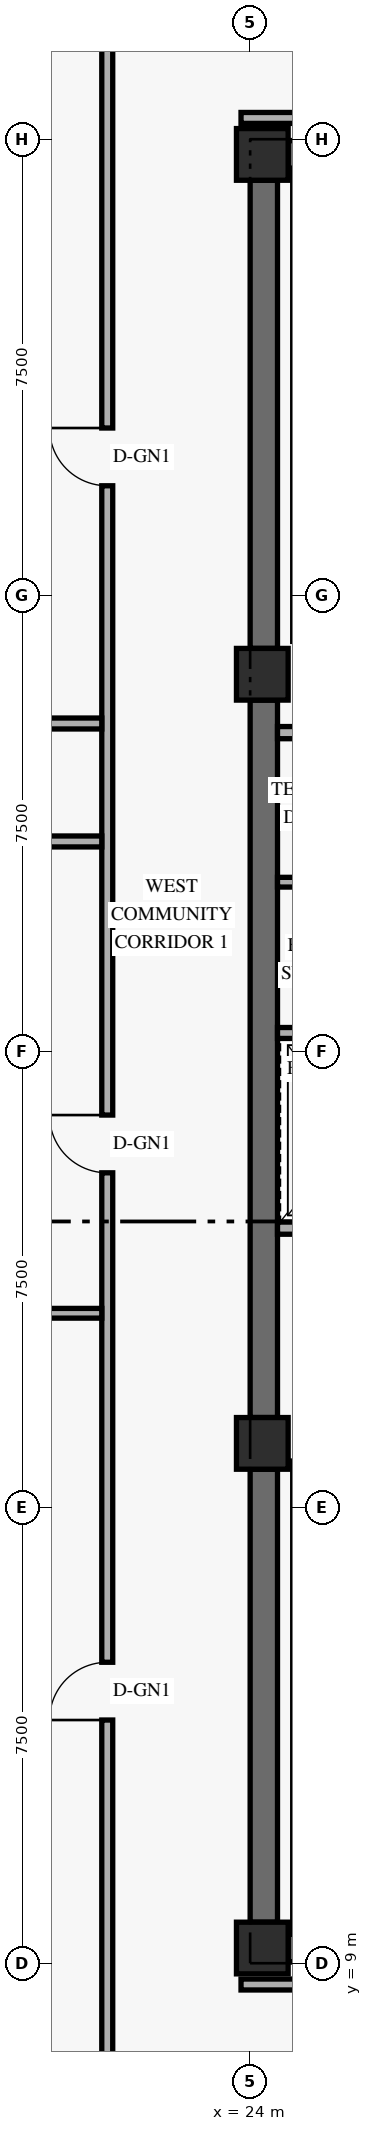
"""IFC4 building model, lengths in metres.
Left out: names, types, materials, properties, quantities, classifications, styles, units other than length and angle.
Written with IfcOpenShell. Run it as: python <this file> out.ifc"""

import sys

from ifc_helpers import new_model, si_unit, direction, frame, frame_2d, origin, origin_2d, place, context, subcontext, project, spatial, rectangle, extrude, element, fill, save


model = new_model("IFC4")
c1 = context("Model", 3, precision=1e-05, world=origin(), true_north=direction((0.0, 1.0)))
c2 = subcontext(c1, "Body", "Model", "MODEL_VIEW")
j1 = project(units=[si_unit("LENGTHUNIT", "METRE"), si_unit("PLANEANGLEUNIT", "RADIAN")], contexts=[c1])
p1 = place(None, origin())
s1 = spatial("IfcSite", under=j1, at=p1, CompositionType="ELEMENT")
p2 = place(p1, origin())
s2 = spatial("IfcBuilding", under=s1, at=p2, CompositionType="ELEMENT")
p3 = place(p2, frame((0.0, 0.0, 60.0)))
s3 = spatial("IfcBuildingStorey", under=s2, at=p3, CompositionType="ELEMENT", Elevation=60.0)
p4 = place(p3, frame((24.225, 9.675, 0.0), z_axis=(0.0, 0.0, 1.0), x_axis=(0.0, 1.0, 0.0)))
e1 = element("IfcWall", 1, at=p4, inside=s3, PredefinedType="SHEAR", context=c2, shape_type="SweptSolid", body=[
    extrude(rectangle(XDim=7.45, YDim=0.45, at=frame_2d((3.725, 0.0))), origin(), (0.0, 0.0, 1.0), 3.267),
])
p5 = place(p3, frame((24.225, 17.975, 0.0), z_axis=(0.0, 0.0, 1.0), x_axis=(0.0, 1.0, 0.0)))
e2 = element("IfcWall", 2, at=p5, inside=s3, PredefinedType="SHEAR", context=c2, shape_type="SweptSolid", body=[
    extrude(rectangle(XDim=11.8, YDim=0.45, at=frame_2d((5.9, 0.0))), origin(), (0.0, 0.0, 1.0), 3.267),
])
p6 = place(p3, frame((24.225, 30.625, 0.0), z_axis=(0.0, 0.0, 1.0), x_axis=(0.0, 1.0, 0.0)))
e3 = element("IfcWall", 3, at=p6, inside=s3, PredefinedType="SHEAR", context=c2, shape_type="SweptSolid", body=[
    extrude(rectangle(XDim=7.7, YDim=0.45, at=frame_2d((3.85, 0.0))), origin(), (0.0, 0.0, 1.0), 3.267),
])
for number, where, z_axis, x_axis in (
    (4, (24.625, 9.25, 0.0), (0.0, 0.0, 1.0), (1.0, 0.0, 0.0)),
    (5, (24.625, 38.75, 0.0), (0.0, 0.0, 1.0), (1.0, 0.0, 0.0)),
):
    element("IfcWall", number, at=place(p3, frame(where, z_axis=z_axis, x_axis=x_axis)), inside=s3, PredefinedType="SHEAR", context=c2, shape_type="SweptSolid", body=[
        extrude(rectangle(XDim=10.15, YDim=0.45, at=frame_2d((5.075, 0.0))), origin(), (0.0, 0.0, 1.0), 3.96),
    ])
for number, where, z_axis, x_axis in (
    (6, (24.2, 9.25, 0.0), (0.0, 0.0, 1.0), (1.0, 0.0, 0.0)),
    (7, (24.2, 17.55, 0.0), (0.0, 0.0, 1.0), (1.0, 0.0, 0.0)),
    (8, (24.2, 30.2, 0.0), (0.0, 0.0, 1.0), (1.0, 0.0, 0.0)),
    (9, (24.2, 38.75, 0.0), (0.0, 0.0, 1.0), (1.0, 0.0, 0.0)),
):
    element("IfcColumn", number, at=place(p3, frame(where, z_axis=z_axis, x_axis=x_axis)), inside=s3, PredefinedType="COLUMN", context=c2, shape_type="SweptSolid", body=[
        extrude(rectangle(XDim=0.85, YDim=0.85, at=origin_2d()), origin(), (0.0, 0.0, 1.0), 4.2),
    ])
p7 = place(p3, frame((24.45, 21.09, 0.0), z_axis=(0.0, 0.0, 1.0), x_axis=(1.0, 0.0, 0.0)))
e10 = element("IfcWall", 10, at=p7, inside=s3, PredefinedType="STANDARD", context=c2, shape_type="SweptSolid", body=[
    extrude(rectangle(XDim=6.83, YDim=0.2, at=frame_2d((3.415, 0.0))), origin(), (0.0, 0.0, 1.0), 3.96),
])
p8 = place(p7, frame((0.72, 0.0, 0.0)))
e11 = element("IfcOpeningElement", 11, at=p8, cuts=e10, PredefinedType="OPENING", context=c2, shape_type="SweptSolid", body=[
    extrude(rectangle(XDim=1.1, YDim=2.2, at=frame_2d((0.55, 1.1))), frame((0.0, 0.11, 0.0), z_axis=(0.0, -1.0, 0.0), x_axis=(1.0, 0.0, 0.0)), (0.0, 0.0, 1.0), 0.22),
])
p9 = place(p7, frame((3.32, 0.0, 0.0)))
e12 = element("IfcOpeningElement", 12, at=p9, cuts=e10, PredefinedType="OPENING", context=c2, shape_type="SweptSolid", body=[
    extrude(rectangle(XDim=1.1, YDim=2.2, at=frame_2d((0.55, 1.1))), frame((0.0, 0.11, 0.0), z_axis=(0.0, -1.0, 0.0), x_axis=(1.0, 0.0, 0.0)), (0.0, 0.0, 1.0), 0.22),
])
p10 = place(p3, frame((24.45, 24.3, 0.0), z_axis=(0.0, 0.0, 1.0), x_axis=(1.0, 0.0, 0.0)))
e13 = element("IfcWall", 13, at=p10, inside=s3, PredefinedType="STANDARD", context=c2, shape_type="SweptSolid", body=[
    extrude(rectangle(XDim=6.83, YDim=0.18, at=frame_2d((3.415, 0.0))), origin(), (0.0, 0.0, 1.0), 3.96),
])
p11 = place(p3, frame((24.45, 29.24, 0.0), z_axis=(0.0, 0.0, 1.0), x_axis=(1.0, 0.0, 0.0)))
e14 = element("IfcWall", 14, at=p11, inside=s3, PredefinedType="STANDARD", context=c2, shape_type="SweptSolid", body=[
    extrude(rectangle(XDim=3.65, YDim=0.2, at=frame_2d((1.825, 0.0))), origin(), (0.0, 0.0, 1.0), 3.96),
])
p12 = place(p3, frame((24.45, 26.78, 0.0), z_axis=(0.0, 0.0, 1.0), x_axis=(1.0, 0.0, 0.0)))
e15 = element("IfcWall", 15, at=p12, inside=s3, PredefinedType="PARTITIONING", context=c2, shape_type="SweptSolid", body=[
    extrude(rectangle(XDim=3.55, YDim=0.16, at=frame_2d((1.775, 0.0))), origin(), (0.0, 0.0, 1.0), 3.96),
])
p13 = place(p3, frame((21.65, 6.8, 0.0), z_axis=(0.0, 0.0, 1.0), x_axis=(0.0, 1.0, 0.0)))
e16 = element("IfcWall", 16, at=p13, inside=s3, PredefinedType="STANDARD", context=c2, shape_type="SweptSolid", body=[
    extrude(rectangle(XDim=34.4, YDim=0.18, at=frame_2d((17.2, 0.0))), origin(), (0.0, 0.0, 1.0), 3.249),
])
p14 = place(p13, frame((15.2, 0.0, 0.0)))
e17 = element("IfcOpeningElement", 17, at=p14, cuts=e16, PredefinedType="OPENING", context=c2, shape_type="SweptSolid", body=[
    extrude(rectangle(XDim=0.95, YDim=2.15, at=frame_2d((0.475, 1.075))), frame((0.0, 0.1, 0.0), z_axis=(0.0, -1.0, 0.0), x_axis=(1.0, 0.0, 0.0)), (0.0, 0.0, 1.0), 0.2),
])
p15 = place(p13, frame((6.2, 0.0, 0.0)))
e18 = element("IfcOpeningElement", 18, at=p15, cuts=e16, PredefinedType="OPENING", context=c2, shape_type="SweptSolid", body=[
    extrude(rectangle(XDim=0.95, YDim=2.15, at=frame_2d((0.475, 1.075))), frame((0.0, 0.1, 0.0), z_axis=(0.0, -1.0, 0.0), x_axis=(1.0, 0.0, 0.0)), (0.0, 0.0, 1.0), 0.2),
])
p16 = place(p13, frame((26.5, 0.0, 0.0)))
e19 = element("IfcOpeningElement", 19, at=p16, cuts=e16, PredefinedType="OPENING", context=c2, shape_type="SweptSolid", body=[
    extrude(rectangle(XDim=0.95, YDim=2.15, at=frame_2d((0.475, 1.075))), frame((0.0, 0.1, 0.0), z_axis=(0.0, -1.0, 0.0), x_axis=(1.0, 0.0, 0.0)), (0.0, 0.0, 1.0), 0.2),
])
for number, where, z_axis, x_axis in (
    (20, (23.85, 8.65, 0.0), (0.0, 0.0, 1.0), (1.0, 0.0, 0.0)),
    (21, (23.85, 39.35, 0.0), (0.0, 0.0, 1.0), (1.0, 0.0, 0.0)),
):
    element("IfcWall", number, at=place(p3, frame(where, z_axis=z_axis, x_axis=x_axis)), inside=s3, PredefinedType="STANDARD", context=c2, shape_type="SweptSolid", body=[
        extrude(rectangle(XDim=11.48, YDim=0.18, at=frame_2d((5.74, 0.0))), origin(), (0.0, 0.0, 1.0), 3.249),
    ])
p17 = place(p3, frame((14.68, 27.45, 0.0), z_axis=(0.0, 0.0, 1.0), x_axis=(1.0, 0.0, 0.0)))
e22 = element("IfcWall", 22, at=p17, inside=s3, PredefinedType="STANDARD", context=c2, shape_type="SweptSolid", body=[
    extrude(rectangle(XDim=6.88, YDim=0.18, at=frame_2d((3.44, 0.0))), origin(), (0.0, 0.0, 1.0), 3.249),
])
p18 = place(p3, frame((2.09, 29.39, 0.0), z_axis=(0.0, 0.0, 1.0), x_axis=(1.0, 0.0, 0.0)))
e23 = element("IfcWall", 23, at=p18, inside=s3, PredefinedType="STANDARD", context=c2, shape_type="SweptSolid", body=[
    extrude(rectangle(XDim=19.47, YDim=0.18, at=frame_2d((9.735, 0.0))), origin(), (0.0, 0.0, 1.0), 3.249),
])
p19 = place(p3, frame((14.68, 19.69, 0.0), z_axis=(0.0, 0.0, 1.0), x_axis=(1.0, 0.0, 0.0)))
e24 = element("IfcWall", 24, at=p19, inside=s3, PredefinedType="PARTITIONING", context=c2, shape_type="SweptSolid", body=[
    extrude(rectangle(XDim=6.88, YDim=0.16, at=frame_2d((3.44, 0.0))), origin(), (0.0, 0.0, 1.0), 3.249),
])
p20 = place(p14, origin())
e25 = element("IfcDoor", 25, at=p20, inside=s3, OperationType="SINGLE_SWING_RIGHT", PredefinedType="DOOR", context=c2, shape_type="SweptSolid", body=[
    extrude(rectangle(XDim=0.95, YDim=2.15, at=frame_2d((0.475, 1.075))), frame((0.0, 0.025, 0.0), z_axis=(0.0, -1.0, 0.0), x_axis=(1.0, 0.0, 0.0)), (0.0, 0.0, 1.0), 0.05),
])
fill(e17, e25)
p21 = place(p15, origin())
e26 = element("IfcDoor", 26, at=p21, inside=s3, OperationType="SINGLE_SWING_LEFT", PredefinedType="DOOR", context=c2, shape_type="SweptSolid", body=[
    extrude(rectangle(XDim=0.95, YDim=2.15, at=frame_2d((0.475, 1.075))), frame((0.0, 0.025, 0.0), z_axis=(0.0, -1.0, 0.0), x_axis=(1.0, 0.0, 0.0)), (0.0, 0.0, 1.0), 0.05),
])
fill(e18, e26)
p22 = place(p16, origin())
e27 = element("IfcDoor", 27, at=p22, inside=s3, OperationType="SINGLE_SWING_RIGHT", PredefinedType="DOOR", context=c2, shape_type="SweptSolid", body=[
    extrude(rectangle(XDim=0.95, YDim=2.15, at=frame_2d((0.475, 1.075))), frame((0.0, 0.025, 0.0), z_axis=(0.0, -1.0, 0.0), x_axis=(1.0, 0.0, 0.0)), (0.0, 0.0, 1.0), 0.05),
])
fill(e19, e27)
save(model, sys.argv[1])
